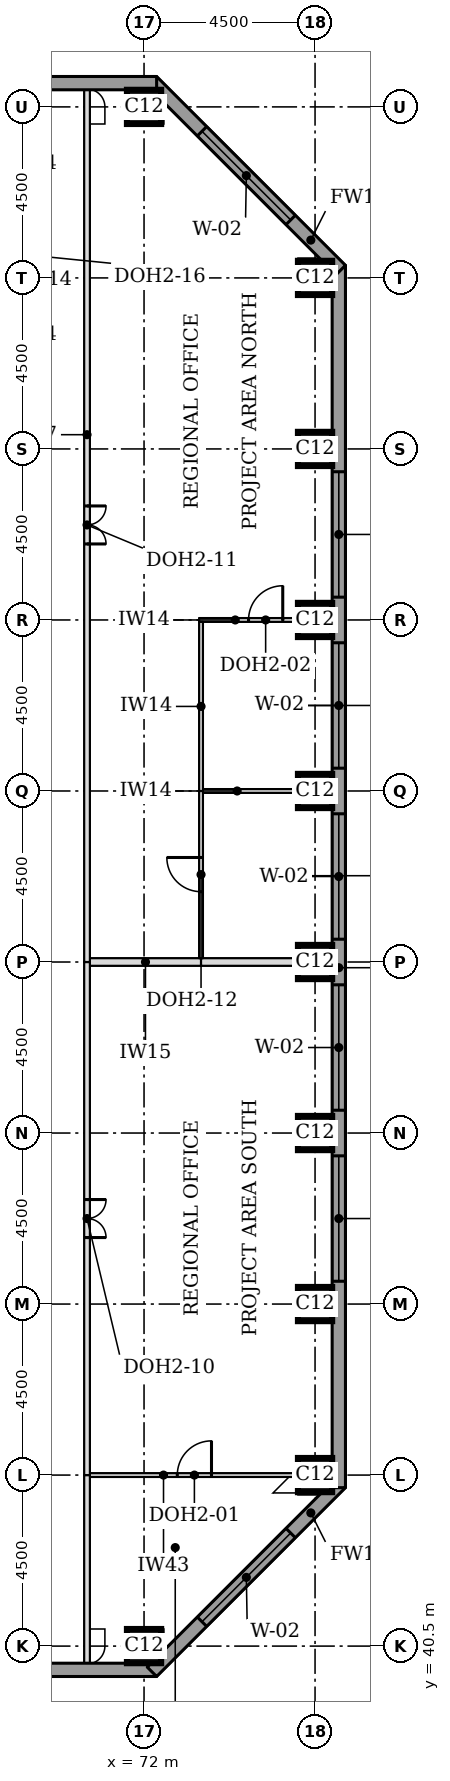
"""IFC4 building model, lengths in metres.
Left out: names, types, materials, properties, quantities, classifications, styles, units other than length and angle.
Written with IfcOpenShell. Run it as: python <this file> out.ifc"""

import sys

from ifc_helpers import new_model, si_unit, direction, frame, frame_2d, origin, origin_2d, place, context, subcontext, project, spatial, rectangle, extrude, element, fill, save


model = new_model("IFC4")
c1 = context("Model", 3, precision=1e-05, world=origin(), true_north=direction((0.0, 1.0)))
c2 = subcontext(c1, "Body", "Model", "MODEL_VIEW")
j1 = project(units=[si_unit("LENGTHUNIT", "METRE"), si_unit("PLANEANGLEUNIT", "RADIAN")], contexts=[c1])
p1 = place(None, origin())
s1 = spatial("IfcSite", under=j1, at=p1, CompositionType="ELEMENT")
p2 = place(p1, origin())
s2 = spatial("IfcBuilding", under=s1, at=p2, CompositionType="ELEMENT")
p3 = place(p2, frame((0.0, 0.0, 155.1)))
s3 = spatial("IfcBuildingStorey", under=s2, at=p3, CompositionType="ELEMENT", Elevation=155.1)
for number, where, z_axis, x_axis in (
    (1, (72.0, 40.5, 0.0), (0.0, 0.0, 1.0), (1.0, 0.0, 0.0)),
    (2, (76.5, 45.0, 0.0), (0.0, 0.0, 1.0), (1.0, 0.0, 0.0)),
    (3, (76.5, 49.5, 0.0), (0.0, 0.0, 1.0), (1.0, 0.0, 0.0)),
    (4, (76.5, 54.0, 0.0), (0.0, 0.0, 1.0), (1.0, 0.0, 0.0)),
    (5, (76.5, 58.5, 0.0), (0.0, 0.0, 1.0), (1.0, 0.0, 0.0)),
    (6, (76.5, 63.0, 0.0), (0.0, 0.0, 1.0), (1.0, 0.0, 0.0)),
    (7, (76.5, 67.5, 0.0), (0.0, 0.0, 1.0), (1.0, 0.0, 0.0)),
    (8, (76.5, 72.0, 0.0), (0.0, 0.0, 1.0), (1.0, 0.0, 0.0)),
    (9, (76.5, 76.5, 0.0), (0.0, 0.0, 1.0), (1.0, 0.0, 0.0)),
    (10, (72.0, 81.0, 0.0), (0.0, 0.0, 1.0), (1.0, 0.0, 0.0)),
):
    element("IfcColumn", number, at=place(p3, frame(where, z_axis=z_axis, x_axis=x_axis)), inside=s3, PredefinedType="COLUMN", context=c2, shape_type="SweptSolid", body=[
        extrude(rectangle(XDim=0.9, YDim=0.9, at=origin_2d()), origin(), (0.0, 0.0, 1.0), 3.7),
    ])
p4 = place(p3, frame((36.0, 39.875, 0.0), z_axis=(0.0, 0.0, 1.0), x_axis=(1.0, 0.0, 0.0)))
e11 = element("IfcWall", 11, at=p4, inside=s3, PredefinedType="STANDARD", context=c2, shape_type="SweptSolid", body=[
    extrude(rectangle(XDim=36.331, YDim=0.35, at=frame_2d((18.166, 0.0))), origin(), (0.0, 0.0, 1.0), 3.525),
])
p5 = place(p4, frame((5.1, 0.0, 0.9)))
e12 = element("IfcOpeningElement", 12, at=p5, cuts=e11, PredefinedType="OPENING", context=c2, shape_type="SweptSolid", body=[
    extrude(rectangle(XDim=3.3, YDim=1.9, at=frame_2d((1.65, 0.95))), frame((0.0, 0.185, 0.0), z_axis=(0.0, -1.0, 0.0), x_axis=(1.0, 0.0, 0.0)), (0.0, 0.0, 1.0), 0.37),
])
p6 = place(p4, frame((9.6, 0.0, 0.9)))
e13 = element("IfcOpeningElement", 13, at=p6, cuts=e11, PredefinedType="OPENING", context=c2, shape_type="SweptSolid", body=[
    extrude(rectangle(XDim=3.3, YDim=1.9, at=frame_2d((1.65, 0.95))), frame((0.0, 0.185, 0.0), z_axis=(0.0, -1.0, 0.0), x_axis=(1.0, 0.0, 0.0)), (0.0, 0.0, 1.0), 0.37),
])
p7 = place(p4, frame((14.1, 0.0, 0.9)))
e14 = element("IfcOpeningElement", 14, at=p7, cuts=e11, PredefinedType="OPENING", context=c2, shape_type="SweptSolid", body=[
    extrude(rectangle(XDim=3.3, YDim=1.9, at=frame_2d((1.65, 0.95))), frame((0.0, 0.185, 0.0), z_axis=(0.0, -1.0, 0.0), x_axis=(1.0, 0.0, 0.0)), (0.0, 0.0, 1.0), 0.37),
])
p8 = place(p4, frame((18.6, 0.0, 0.9)))
e15 = element("IfcOpeningElement", 15, at=p8, cuts=e11, PredefinedType="OPENING", context=c2, shape_type="SweptSolid", body=[
    extrude(rectangle(XDim=3.3, YDim=1.9, at=frame_2d((1.65, 0.95))), frame((0.0, 0.185, 0.0), z_axis=(0.0, -1.0, 0.0), x_axis=(1.0, 0.0, 0.0)), (0.0, 0.0, 1.0), 0.37),
])
p9 = place(p4, frame((23.1, 0.0, 0.9)))
e16 = element("IfcOpeningElement", 16, at=p9, cuts=e11, PredefinedType="OPENING", context=c2, shape_type="SweptSolid", body=[
    extrude(rectangle(XDim=3.3, YDim=1.9, at=frame_2d((1.65, 0.95))), frame((0.0, 0.185, 0.0), z_axis=(0.0, -1.0, 0.0), x_axis=(1.0, 0.0, 0.0)), (0.0, 0.0, 1.0), 0.37),
])
p10 = place(p4, frame((27.6, 0.0, 0.9)))
e17 = element("IfcOpeningElement", 17, at=p10, cuts=e11, PredefinedType="OPENING", context=c2, shape_type="SweptSolid", body=[
    extrude(rectangle(XDim=3.3, YDim=1.9, at=frame_2d((1.65, 0.95))), frame((0.0, 0.185, 0.0), z_axis=(0.0, -1.0, 0.0), x_axis=(1.0, 0.0, 0.0)), (0.0, 0.0, 1.0), 0.37),
])
p11 = place(p3, frame((72.208, 39.824, 0.0), z_axis=(0.0, 0.0, 1.0), x_axis=(0.707106781187, 0.707106781187, 0.0)))
e18 = element("IfcWall", 18, at=p11, inside=s3, PredefinedType="STANDARD", context=c2, shape_type="SweptSolid", body=[
    extrude(rectangle(XDim=7.027, YDim=0.35, at=frame_2d((3.513, 0.0))), origin(), (0.0, 0.0, 1.0), 3.525),
])
p12 = place(p11, frame((1.863, 0.0, 0.9)))
e19 = element("IfcOpeningElement", 19, at=p12, cuts=e18, PredefinedType="OPENING", context=c2, shape_type="SweptSolid", body=[
    extrude(rectangle(XDim=3.3, YDim=1.9, at=frame_2d((1.65, 0.95))), frame((0.0, 0.185, 0.0), z_axis=(0.0, -1.0, 0.0), x_axis=(1.0, 0.0, 0.0)), (0.0, 0.0, 1.0), 0.37),
])
p13 = place(p3, frame((77.125, 44.669, 0.0), z_axis=(0.0, 0.0, 1.0), x_axis=(0.0, 1.0, 0.0)))
e20 = element("IfcWall", 20, at=p13, inside=s3, PredefinedType="STANDARD", context=c2, shape_type="SweptSolid", body=[
    extrude(rectangle(XDim=32.163, YDim=0.35, at=frame_2d((16.081, 0.0))), origin(), (0.0, 0.0, 1.0), 3.525),
])
p14 = place(p13, frame((5.431, 0.0, 0.9)))
e21 = element("IfcOpeningElement", 21, at=p14, cuts=e20, PredefinedType="OPENING", context=c2, shape_type="SweptSolid", body=[
    extrude(rectangle(XDim=3.3, YDim=1.9, at=frame_2d((1.65, 0.95))), frame((0.0, 0.185, 0.0), z_axis=(0.0, -1.0, 0.0), x_axis=(1.0, 0.0, 0.0)), (0.0, 0.0, 1.0), 0.37),
])
p15 = place(p13, frame((9.931, 0.0, 0.9)))
e22 = element("IfcOpeningElement", 22, at=p15, cuts=e20, PredefinedType="OPENING", context=c2, shape_type="SweptSolid", body=[
    extrude(rectangle(XDim=3.3, YDim=1.9, at=frame_2d((1.65, 0.95))), frame((0.0, 0.185, 0.0), z_axis=(0.0, -1.0, 0.0), x_axis=(1.0, 0.0, 0.0)), (0.0, 0.0, 1.0), 0.37),
])
p16 = place(p13, frame((14.431, 0.0, 0.9)))
e23 = element("IfcOpeningElement", 23, at=p16, cuts=e20, PredefinedType="OPENING", context=c2, shape_type="SweptSolid", body=[
    extrude(rectangle(XDim=3.3, YDim=1.9, at=frame_2d((1.65, 0.95))), frame((0.0, 0.185, 0.0), z_axis=(0.0, -1.0, 0.0), x_axis=(1.0, 0.0, 0.0)), (0.0, 0.0, 1.0), 0.37),
])
p17 = place(p13, frame((18.931, 0.0, 0.9)))
e24 = element("IfcOpeningElement", 24, at=p17, cuts=e20, PredefinedType="OPENING", context=c2, shape_type="SweptSolid", body=[
    extrude(rectangle(XDim=3.3, YDim=1.9, at=frame_2d((1.65, 0.95))), frame((0.0, 0.185, 0.0), z_axis=(0.0, -1.0, 0.0), x_axis=(1.0, 0.0, 0.0)), (0.0, 0.0, 1.0), 0.37),
])
p18 = place(p13, frame((23.431, 0.0, 0.9)))
e25 = element("IfcOpeningElement", 25, at=p18, cuts=e20, PredefinedType="OPENING", context=c2, shape_type="SweptSolid", body=[
    extrude(rectangle(XDim=3.3, YDim=1.9, at=frame_2d((1.65, 0.95))), frame((0.0, 0.185, 0.0), z_axis=(0.0, -1.0, 0.0), x_axis=(1.0, 0.0, 0.0)), (0.0, 0.0, 1.0), 0.37),
])
p19 = place(p3, frame((77.176, 76.708, 0.0), z_axis=(0.0, 0.0, 1.0), x_axis=(-0.707106781187, 0.707106781187, 0.0)))
e26 = element("IfcWall", 26, at=p19, inside=s3, PredefinedType="STANDARD", context=c2, shape_type="SweptSolid", body=[
    extrude(rectangle(XDim=7.027, YDim=0.35, at=frame_2d((3.513, 0.0))), origin(), (0.0, 0.0, 1.0), 3.525),
])
p20 = place(p19, frame((1.863, 0.0, 0.9)))
e27 = element("IfcOpeningElement", 27, at=p20, cuts=e26, PredefinedType="OPENING", context=c2, shape_type="SweptSolid", body=[
    extrude(rectangle(XDim=3.3, YDim=1.9, at=frame_2d((1.65, 0.95))), frame((0.0, 0.185, 0.0), z_axis=(0.0, -1.0, 0.0), x_axis=(1.0, 0.0, 0.0)), (0.0, 0.0, 1.0), 0.37),
])
p21 = place(p3, frame((72.331, 81.625, 0.0), z_axis=(0.0, 0.0, 1.0), x_axis=(-1.0, 0.0, 0.0)))
e28 = element("IfcWall", 28, at=p21, inside=s3, PredefinedType="STANDARD", context=c2, shape_type="SweptSolid", body=[
    extrude(rectangle(XDim=32.163, YDim=0.35, at=frame_2d((16.081, 0.0))), origin(), (0.0, 0.0, 1.0), 3.525),
])
p22 = place(p21, frame((5.431, 0.0, 0.9)))
e29 = element("IfcOpeningElement", 29, at=p22, cuts=e28, PredefinedType="OPENING", context=c2, shape_type="SweptSolid", body=[
    extrude(rectangle(XDim=3.3, YDim=1.9, at=frame_2d((1.65, 0.95))), frame((0.0, 0.185, 0.0), z_axis=(0.0, -1.0, 0.0), x_axis=(1.0, 0.0, 0.0)), (0.0, 0.0, 1.0), 0.37),
])
p23 = place(p21, frame((9.931, 0.0, 0.9)))
e30 = element("IfcOpeningElement", 30, at=p23, cuts=e28, PredefinedType="OPENING", context=c2, shape_type="SweptSolid", body=[
    extrude(rectangle(XDim=3.3, YDim=1.9, at=frame_2d((1.65, 0.95))), frame((0.0, 0.185, 0.0), z_axis=(0.0, -1.0, 0.0), x_axis=(1.0, 0.0, 0.0)), (0.0, 0.0, 1.0), 0.37),
])
p24 = place(p21, frame((14.431, 0.0, 0.9)))
e31 = element("IfcOpeningElement", 31, at=p24, cuts=e28, PredefinedType="OPENING", context=c2, shape_type="SweptSolid", body=[
    extrude(rectangle(XDim=3.3, YDim=1.9, at=frame_2d((1.65, 0.95))), frame((0.0, 0.185, 0.0), z_axis=(0.0, -1.0, 0.0), x_axis=(1.0, 0.0, 0.0)), (0.0, 0.0, 1.0), 0.37),
])
p25 = place(p21, frame((18.931, 0.0, 0.9)))
e32 = element("IfcOpeningElement", 32, at=p25, cuts=e28, PredefinedType="OPENING", context=c2, shape_type="SweptSolid", body=[
    extrude(rectangle(XDim=3.3, YDim=1.9, at=frame_2d((1.65, 0.95))), frame((0.0, 0.185, 0.0), z_axis=(0.0, -1.0, 0.0), x_axis=(1.0, 0.0, 0.0)), (0.0, 0.0, 1.0), 0.37),
])
p26 = place(p21, frame((23.431, 0.0, 0.9)))
e33 = element("IfcOpeningElement", 33, at=p26, cuts=e28, PredefinedType="OPENING", context=c2, shape_type="SweptSolid", body=[
    extrude(rectangle(XDim=3.3, YDim=1.9, at=frame_2d((1.65, 0.95))), frame((0.0, 0.185, 0.0), z_axis=(0.0, -1.0, 0.0), x_axis=(1.0, 0.0, 0.0)), (0.0, 0.0, 1.0), 0.37),
])
p27 = place(p3, frame((70.575, 45.0, 0.0), z_axis=(0.0, 0.0, 1.0), x_axis=(1.0, 0.0, 0.0)))
e34 = element("IfcWall", 34, at=p27, inside=s3, PredefinedType="PARTITIONING", context=c2, shape_type="SweptSolid", body=[
    extrude(rectangle(XDim=5.475, YDim=0.1, at=frame_2d((2.738, 0.0))), origin(), (0.0, 0.0, 1.0), 3.096),
])
p28 = place(p27, frame((2.3, 0.0, 0.0)))
e35 = element("IfcOpeningElement", 35, at=p28, cuts=e34, PredefinedType="OPENING", context=c2, shape_type="SweptSolid", body=[
    extrude(rectangle(XDim=0.9, YDim=2.1, at=frame_2d((0.45, 1.05))), frame((0.0, 0.06, 0.0), z_axis=(0.0, -1.0, 0.0), x_axis=(1.0, 0.0, 0.0)), (0.0, 0.0, 1.0), 0.12),
])
p29 = place(p3, frame((70.575, 58.5, 0.0), z_axis=(0.0, 0.0, 1.0), x_axis=(1.0, 0.0, 0.0)))
e36 = element("IfcWall", 36, at=p29, inside=s3, PredefinedType="PARTITIONING", context=c2, shape_type="SweptSolid", body=[
    extrude(rectangle(XDim=2.925, YDim=0.2, at=frame_2d((1.462, 0.0))), origin(), (0.0, 0.0, 1.0), 3.55),
])
p30 = place(p3, frame((73.5, 58.5, 0.0), z_axis=(0.0, 0.0, 1.0), x_axis=(1.0, 0.0, 0.0)))
e37 = element("IfcWall", 37, at=p30, inside=s3, PredefinedType="PARTITIONING", context=c2, shape_type="SweptSolid", body=[
    extrude(rectangle(XDim=3.45, YDim=0.2, at=frame_2d((1.725, 0.0))), origin(), (0.0, 0.0, 1.0), 3.55),
])
p31 = place(p3, frame((73.55, 63.0, 0.0), z_axis=(0.0, 0.0, 1.0), x_axis=(1.0, 0.0, 0.0)))
e38 = element("IfcWall", 38, at=p31, inside=s3, PredefinedType="PARTITIONING", context=c2, shape_type="SweptSolid", body=[
    extrude(rectangle(XDim=3.4, YDim=0.1, at=frame_2d((1.7, 0.0))), origin(), (0.0, 0.0, 1.0), 3.55),
])
p32 = place(p3, frame((73.45, 67.5, 0.0), z_axis=(0.0, 0.0, 1.0), x_axis=(1.0, 0.0, 0.0)))
e39 = element("IfcWall", 39, at=p32, inside=s3, PredefinedType="PARTITIONING", context=c2, shape_type="SweptSolid", body=[
    extrude(rectangle(XDim=3.5, YDim=0.1, at=frame_2d((1.75, 0.0))), origin(), (0.0, 0.0, 1.0), 3.55),
])
p33 = place(p32, frame((1.3, 0.0, 0.0)))
e40 = element("IfcOpeningElement", 40, at=p33, cuts=e39, PredefinedType="OPENING", context=c2, shape_type="SweptSolid", body=[
    extrude(rectangle(XDim=0.9, YDim=2.1, at=frame_2d((0.45, 1.05))), frame((0.0, 0.06, 0.0), z_axis=(0.0, -1.0, 0.0), x_axis=(1.0, 0.0, 0.0)), (0.0, 0.0, 1.0), 0.12),
])
p34 = place(p3, frame((70.5, 40.05, 0.0), z_axis=(0.0, 0.0, 1.0), x_axis=(0.0, 1.0, 0.0)))
e41 = element("IfcWall", 41, at=p34, inside=s3, PredefinedType="PARTITIONING", context=c2, shape_type="SweptSolid", body=[
    extrude(rectangle(XDim=4.95, YDim=0.15, at=frame_2d((2.475, 0.0))), origin(), (0.0, 0.0, 1.0), 3.55),
])
p35 = place(p3, frame((70.5, 45.0, 0.0), z_axis=(0.0, 0.0, 1.0), x_axis=(0.0, 1.0, 0.0)))
e42 = element("IfcWall", 42, at=p35, inside=s3, PredefinedType="PARTITIONING", context=c2, shape_type="SweptSolid", body=[
    extrude(rectangle(XDim=13.5, YDim=0.15, at=frame_2d((6.75, 0.0))), origin(), (0.0, 0.0, 1.0), 3.55),
])
p36 = place(p35, frame((6.25, 0.0, 0.0)))
e43 = element("IfcOpeningElement", 43, at=p36, cuts=e42, PredefinedType="OPENING", context=c2, shape_type="SweptSolid", body=[
    extrude(rectangle(XDim=1.0, YDim=2.1, at=frame_2d((0.5, 1.05))), frame((0.0, 0.085, 0.0), z_axis=(0.0, -1.0, 0.0), x_axis=(1.0, 0.0, 0.0)), (0.0, 0.0, 1.0), 0.17),
])
p37 = place(p3, frame((70.5, 58.5, 0.0), z_axis=(0.0, 0.0, 1.0), x_axis=(0.0, 1.0, 0.0)))
e44 = element("IfcWall", 44, at=p37, inside=s3, PredefinedType="PARTITIONING", context=c2, shape_type="SweptSolid", body=[
    extrude(rectangle(XDim=22.95, YDim=0.15, at=frame_2d((11.475, 0.0))), origin(), (0.0, 0.0, 1.0), 3.55),
])
p38 = place(p37, frame((11.0, 0.0, 0.0)))
e45 = element("IfcOpeningElement", 45, at=p38, cuts=e44, PredefinedType="OPENING", context=c2, shape_type="SweptSolid", body=[
    extrude(rectangle(XDim=1.0, YDim=2.1, at=frame_2d((0.5, 1.05))), frame((0.0, 0.085, 0.0), z_axis=(0.0, -1.0, 0.0), x_axis=(1.0, 0.0, 0.0)), (0.0, 0.0, 1.0), 0.17),
])
p39 = place(p3, frame((73.5, 58.6, 0.0), z_axis=(0.0, 0.0, 1.0), x_axis=(0.0, 1.0, 0.0)))
e46 = element("IfcWall", 46, at=p39, inside=s3, PredefinedType="PARTITIONING", context=c2, shape_type="SweptSolid", body=[
    extrude(rectangle(XDim=4.4, YDim=0.1, at=frame_2d((2.2, 0.0))), origin(), (0.0, 0.0, 1.0), 3.55),
])
p40 = place(p39, frame((1.75, 0.0, 0.0)))
e47 = element("IfcOpeningElement", 47, at=p40, cuts=e46, PredefinedType="OPENING", context=c2, shape_type="SweptSolid", body=[
    extrude(rectangle(XDim=0.9, YDim=2.1, at=frame_2d((0.45, 1.05))), frame((0.0, 0.06, 0.0), z_axis=(0.0, -1.0, 0.0), x_axis=(1.0, 0.0, 0.0)), (0.0, 0.0, 1.0), 0.12),
])
p41 = place(p3, frame((73.5, 63.0, 0.0), z_axis=(0.0, 0.0, 1.0), x_axis=(0.0, 1.0, 0.0)))
e48 = element("IfcWall", 48, at=p41, inside=s3, PredefinedType="PARTITIONING", context=c2, shape_type="SweptSolid", body=[
    extrude(rectangle(XDim=4.45, YDim=0.1, at=frame_2d((2.225, 0.0))), origin(), (0.0, 0.0, 1.0), 3.55),
])
p42 = place(p12, origin())
e49 = element("IfcWindow", 49, at=p42, inside=s3, PartitioningType="SINGLE_PANEL", PredefinedType="WINDOW", context=c2, shape_type="SweptSolid", body=[
    extrude(rectangle(XDim=3.3, YDim=1.9, at=frame_2d((1.65, 0.95))), frame((0.0, 0.085, 0.0), z_axis=(0.0, -1.0, 0.0), x_axis=(1.0, 0.0, 0.0)), (0.0, 0.0, 1.0), 0.06),
])
fill(e19, e49)
p43 = place(p14, origin())
e50 = element("IfcWindow", 50, at=p43, inside=s3, PartitioningType="SINGLE_PANEL", PredefinedType="WINDOW", context=c2, shape_type="SweptSolid", body=[
    extrude(rectangle(XDim=3.3, YDim=1.9, at=frame_2d((1.65, 0.95))), frame((0.0, 0.085, 0.0), z_axis=(0.0, -1.0, 0.0), x_axis=(1.0, 0.0, 0.0)), (0.0, 0.0, 1.0), 0.06),
])
fill(e21, e50)
p44 = place(p15, origin())
e51 = element("IfcWindow", 51, at=p44, inside=s3, PartitioningType="SINGLE_PANEL", PredefinedType="WINDOW", context=c2, shape_type="SweptSolid", body=[
    extrude(rectangle(XDim=3.3, YDim=1.9, at=frame_2d((1.65, 0.95))), frame((0.0, 0.085, 0.0), z_axis=(0.0, -1.0, 0.0), x_axis=(1.0, 0.0, 0.0)), (0.0, 0.0, 1.0), 0.06),
])
fill(e22, e51)
p45 = place(p16, origin())
e52 = element("IfcWindow", 52, at=p45, inside=s3, PartitioningType="SINGLE_PANEL", PredefinedType="WINDOW", context=c2, shape_type="SweptSolid", body=[
    extrude(rectangle(XDim=3.3, YDim=1.9, at=frame_2d((1.65, 0.95))), frame((0.0, 0.085, 0.0), z_axis=(0.0, -1.0, 0.0), x_axis=(1.0, 0.0, 0.0)), (0.0, 0.0, 1.0), 0.06),
])
fill(e23, e52)
p46 = place(p17, origin())
e53 = element("IfcWindow", 53, at=p46, inside=s3, PartitioningType="SINGLE_PANEL", PredefinedType="WINDOW", context=c2, shape_type="SweptSolid", body=[
    extrude(rectangle(XDim=3.3, YDim=1.9, at=frame_2d((1.65, 0.95))), frame((0.0, 0.085, 0.0), z_axis=(0.0, -1.0, 0.0), x_axis=(1.0, 0.0, 0.0)), (0.0, 0.0, 1.0), 0.06),
])
fill(e24, e53)
p47 = place(p18, origin())
e54 = element("IfcWindow", 54, at=p47, inside=s3, PartitioningType="SINGLE_PANEL", PredefinedType="WINDOW", context=c2, shape_type="SweptSolid", body=[
    extrude(rectangle(XDim=3.3, YDim=1.9, at=frame_2d((1.65, 0.95))), frame((0.0, 0.085, 0.0), z_axis=(0.0, -1.0, 0.0), x_axis=(1.0, 0.0, 0.0)), (0.0, 0.0, 1.0), 0.06),
])
fill(e25, e54)
p48 = place(p20, origin())
e55 = element("IfcWindow", 55, at=p48, inside=s3, PartitioningType="SINGLE_PANEL", PredefinedType="WINDOW", context=c2, shape_type="SweptSolid", body=[
    extrude(rectangle(XDim=3.3, YDim=1.9, at=frame_2d((1.65, 0.95))), frame((0.0, 0.085, 0.0), z_axis=(0.0, -1.0, 0.0), x_axis=(1.0, 0.0, 0.0)), (0.0, 0.0, 1.0), 0.06),
])
fill(e27, e55)
p49 = place(p36, frame((1.0, 0.0, 0.0), z_axis=(0.0, 0.0, 1.0), x_axis=(-1.0, 0.0, 0.0)))
e56 = element("IfcDoor", 56, at=p49, inside=s3, OperationType="DOUBLE_DOOR_SINGLE_SWING", PredefinedType="DOOR", context=c2, shape_type="SweptSolid", body=[
    extrude(rectangle(XDim=1.0, YDim=2.1, at=frame_2d((0.5, 1.05))), frame((0.0, 0.025, 0.0), z_axis=(0.0, -1.0, 0.0), x_axis=(1.0, 0.0, 0.0)), (0.0, 0.0, 1.0), 0.05),
])
fill(e43, e56)
p50 = place(p28, origin())
e57 = element("IfcDoor", 57, at=p50, inside=s3, OperationType="SINGLE_SWING_RIGHT", PredefinedType="DOOR", context=c2, shape_type="SweptSolid", body=[
    extrude(rectangle(XDim=0.9, YDim=2.1, at=frame_2d((0.45, 1.05))), frame((0.0, 0.025, 0.0), z_axis=(0.0, -1.0, 0.0), x_axis=(1.0, 0.0, 0.0)), (0.0, 0.0, 1.0), 0.05),
])
fill(e35, e57)
p51 = place(p38, frame((1.0, 0.0, 0.0), z_axis=(0.0, 0.0, 1.0), x_axis=(-1.0, 0.0, 0.0)))
e58 = element("IfcDoor", 58, at=p51, inside=s3, OperationType="DOUBLE_DOOR_SINGLE_SWING", PredefinedType="DOOR", context=c2, shape_type="SweptSolid", body=[
    extrude(rectangle(XDim=1.0, YDim=2.1, at=frame_2d((0.5, 1.05))), frame((0.0, 0.025, 0.0), z_axis=(0.0, -1.0, 0.0), x_axis=(1.0, 0.0, 0.0)), (0.0, 0.0, 1.0), 0.05),
])
fill(e45, e58)
p52 = place(p40, origin())
e59 = element("IfcDoor", 59, at=p52, inside=s3, OperationType="SINGLE_SWING_RIGHT", PredefinedType="DOOR", context=c2, shape_type="SweptSolid", body=[
    extrude(rectangle(XDim=0.9, YDim=2.1, at=frame_2d((0.45, 1.05))), frame((0.0, 0.025, 0.0), z_axis=(0.0, -1.0, 0.0), x_axis=(1.0, 0.0, 0.0)), (0.0, 0.0, 1.0), 0.05),
])
fill(e47, e59)
p53 = place(p33, origin())
e60 = element("IfcDoor", 60, at=p53, inside=s3, OperationType="SINGLE_SWING_RIGHT", PredefinedType="DOOR", context=c2, shape_type="SweptSolid", body=[
    extrude(rectangle(XDim=0.9, YDim=2.1, at=frame_2d((0.45, 1.05))), frame((0.0, 0.025, 0.0), z_axis=(0.0, -1.0, 0.0), x_axis=(1.0, 0.0, 0.0)), (0.0, 0.0, 1.0), 0.05),
])
fill(e40, e60)
save(model, sys.argv[1])
